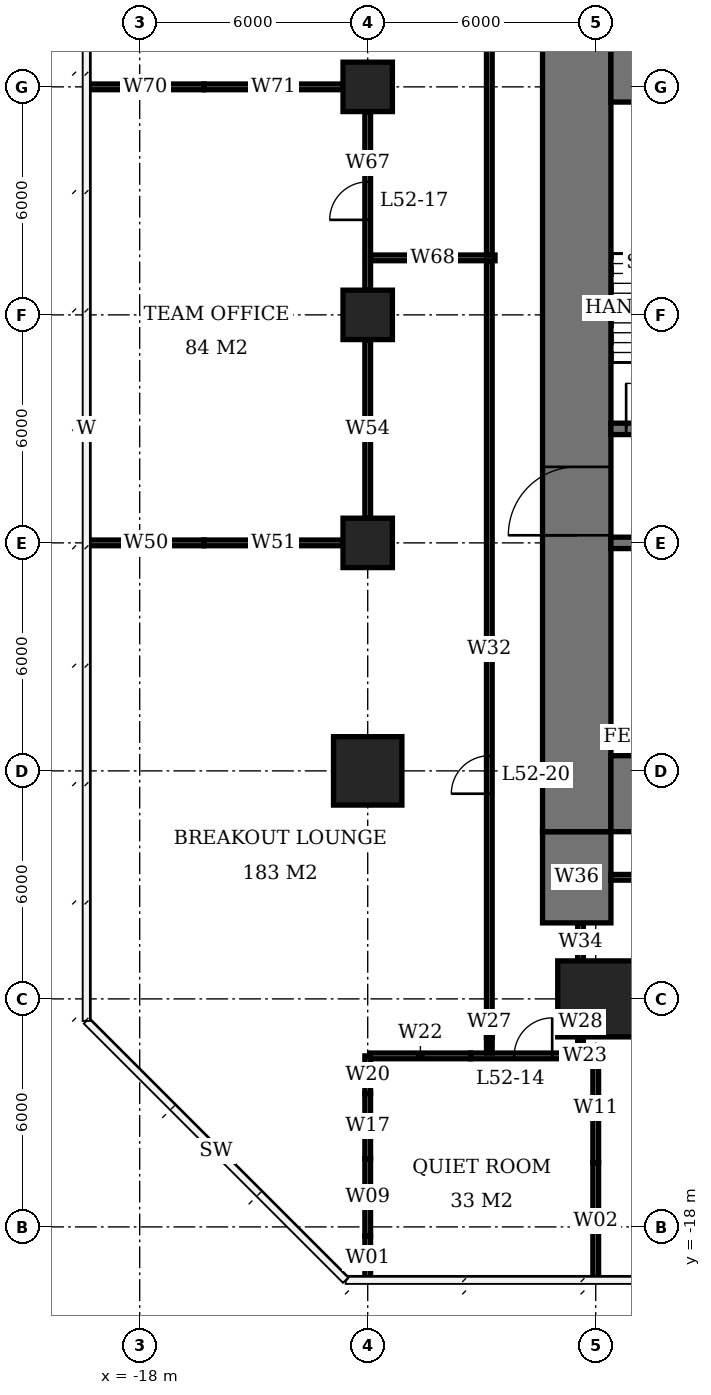
"""IFC4 building model, lengths in metres.
Left out: names, types, materials, properties, quantities, classifications, styles, units other than length and angle.
Written with IfcOpenShell. Run it as: python <this file> out.ifc"""

import sys

from ifc_helpers import new_model, si_unit, direction, frame, frame_2d, origin, origin_2d, place, context, subcontext, project, spatial, rectangle, extrude, element, fill, save


model = new_model("IFC4")
c1 = context("Model", 3, precision=1e-05, world=origin(), true_north=direction((0.0, 1.0)))
c2 = subcontext(c1, "Body", "Model", "MODEL_VIEW")
j1 = project(units=[si_unit("LENGTHUNIT", "METRE"), si_unit("PLANEANGLEUNIT", "RADIAN")], contexts=[c1])
p1 = place(None, origin())
s1 = spatial("IfcSite", under=j1, at=p1, CompositionType="ELEMENT")
p2 = place(p1, origin())
s2 = spatial("IfcBuilding", under=s1, at=p2, CompositionType="ELEMENT")
p3 = place(p2, frame((0.0, 0.0, 212.3)))
s3 = spatial("IfcBuildingStorey", under=s2, at=p3, CompositionType="ELEMENT", Elevation=212.3)
p4 = place(p3, frame((-12.0, -6.0, 0.0), z_axis=(0.0, 0.0, 1.0), x_axis=(1.0, 0.0, 0.0)))
e1 = element("IfcColumn", 1, at=p4, inside=s3, PredefinedType="COLUMN", context=c2, shape_type="SweptSolid", body=[
    extrude(rectangle(XDim=1.8, YDim=1.8, at=origin_2d()), origin(), (0.0, 0.0, 1.0), 3.9),
])
for number, where, z_axis, x_axis in (
    (2, (-12.0, 0.0, 0.0), (0.0, 0.0, 1.0), (1.0, 0.0, 0.0)),
    (3, (-12.0, 6.0, 0.0), (0.0, 0.0, 1.0), (1.0, 0.0, 0.0)),
    (4, (-12.0, 12.0, 0.0), (0.0, 0.0, 1.0), (1.0, 0.0, 0.0)),
):
    element("IfcColumn", number, at=place(p3, frame(where, z_axis=z_axis, x_axis=x_axis)), inside=s3, PredefinedType="COLUMN", context=c2, shape_type="SweptSolid", body=[
        extrude(rectangle(XDim=1.3, YDim=1.3, at=origin_2d()), origin(), (0.0, 0.0, 1.0), 3.9),
    ])
p5 = place(p3, frame((-6.0, -12.0, 0.0), z_axis=(0.0, 0.0, 1.0), x_axis=(1.0, 0.0, 0.0)))
e5 = element("IfcColumn", 5, at=p5, inside=s3, PredefinedType="COLUMN", context=c2, shape_type="SweptSolid", body=[
    extrude(rectangle(XDim=2.0, YDim=2.0, at=origin_2d()), origin(), (0.0, 0.0, 1.0), 3.9),
])
for number, where, z_axis, x_axis in (
    (6, (-5.6, -6.6, 0.0), (0.0, 0.0, 1.0), (1.0, 0.0, 0.0)),
    (7, (-5.6, 12.6, 0.0), (0.0, 0.0, 1.0), (1.0, 0.0, 0.0)),
):
    element("IfcWall", number, at=place(p3, frame(where, z_axis=z_axis, x_axis=x_axis)), inside=s3, PredefinedType="SHEAR", context=c2, shape_type="SweptSolid", body=[
        extrude(rectangle(XDim=23.2, YDim=2.0, at=frame_2d((11.6, 0.0))), origin(), (0.0, 0.0, 1.0), 3.9),
    ])
p6 = place(p3, frame((-6.5, -7.6, 0.0), z_axis=(0.0, 0.0, 1.0), x_axis=(0.0, 1.0, 0.0)))
e8 = element("IfcWall", 8, at=p6, inside=s3, PredefinedType="SHEAR", context=c2, shape_type="SweptSolid", body=[
    extrude(rectangle(XDim=21.2, YDim=1.8, at=frame_2d((10.6, 0.0))), origin(), (0.0, 0.0, 1.0), 3.9),
])
p7 = place(p6, frame((7.8, 0.0, 0.0)))
e9 = element("IfcOpeningElement", 9, at=p7, cuts=e8, PredefinedType="OPENING", context=c2, shape_type="SweptSolid", body=[
    extrude(rectangle(XDim=1.8, YDim=2.4, at=frame_2d((0.9, 1.2))), frame((0.0, 0.91, 0.0), z_axis=(0.0, -1.0, 0.0), x_axis=(1.0, 0.0, 0.0)), (0.0, 0.0, 1.0), 1.82),
])
p8 = place(p3, frame((-6.5, -10.0, 0.0), z_axis=(0.0, 0.0, 1.0), x_axis=(0.0, 1.0, 0.0)))
e10 = element("IfcWall", 10, at=p8, inside=s3, PredefinedType="SHEAR", context=c2, shape_type="SweptSolid", body=[
    extrude(rectangle(XDim=2.4, YDim=1.8, at=frame_2d((1.2, 0.0))), origin(), (0.0, 0.0, 1.0), 3.9),
])
p9 = place(p3, frame((-5.6, 0.0, 0.0), z_axis=(0.0, 0.0, 1.0), x_axis=(1.0, 0.0, 0.0)))
e11 = element("IfcWall", 11, at=p9, inside=s3, PredefinedType="SHEAR", context=c2, shape_type="SweptSolid", body=[
    extrude(rectangle(XDim=17.75, YDim=0.3, at=frame_2d((8.875, 0.0))), origin(), (0.0, 0.0, 1.0), 3.9),
])
p10 = place(p9, frame((0.6, 0.0, 0.0)))
e12 = element("IfcOpeningElement", 12, at=p10, cuts=e11, PredefinedType="OPENING", context=c2, shape_type="SweptSolid", body=[
    extrude(rectangle(XDim=0.9, YDim=2.1, at=frame_2d((0.45, 1.05))), frame((0.0, 0.16, 0.0), z_axis=(0.0, -1.0, 0.0), x_axis=(1.0, 0.0, 0.0)), (0.0, 0.0, 1.0), 0.32),
])
p11 = place(p9, frame((3.7, 0.0, 0.0)))
e13 = element("IfcOpeningElement", 13, at=p11, cuts=e11, PredefinedType="OPENING", context=c2, shape_type="SweptSolid", body=[
    extrude(rectangle(XDim=1.0, YDim=2.1, at=frame_2d((0.5, 1.05))), frame((0.0, 0.16, 0.0), z_axis=(0.0, -1.0, 0.0), x_axis=(1.0, 0.0, 0.0)), (0.0, 0.0, 1.0), 0.32),
])
p12 = place(p9, frame((9.6, 0.0, 0.0)))
e14 = element("IfcOpeningElement", 14, at=p12, cuts=e11, PredefinedType="OPENING", context=c2, shape_type="SweptSolid", body=[
    extrude(rectangle(XDim=1.0, YDim=2.1, at=frame_2d((0.5, 1.05))), frame((0.0, 0.16, 0.0), z_axis=(0.0, -1.0, 0.0), x_axis=(1.0, 0.0, 0.0)), (0.0, 0.0, 1.0), 0.32),
])
p13 = place(p9, frame((12.55, 0.0, 0.0)))
e15 = element("IfcOpeningElement", 15, at=p13, cuts=e11, PredefinedType="OPENING", context=c2, shape_type="SweptSolid", body=[
    extrude(rectangle(XDim=1.1, YDim=2.1, at=frame_2d((0.55, 1.05))), frame((0.0, 0.16, 0.0), z_axis=(0.0, -1.0, 0.0), x_axis=(1.0, 0.0, 0.0)), (0.0, 0.0, 1.0), 0.32),
])
p14 = place(p9, frame((15.55, 0.0, 0.0)))
e16 = element("IfcOpeningElement", 16, at=p14, cuts=e11, PredefinedType="OPENING", context=c2, shape_type="SweptSolid", body=[
    extrude(rectangle(XDim=1.1, YDim=2.1, at=frame_2d((0.55, 1.05))), frame((0.0, 0.16, 0.0), z_axis=(0.0, -1.0, 0.0), x_axis=(1.0, 0.0, 0.0)), (0.0, 0.0, 1.0), 0.32),
])
p15 = place(p3, frame((-5.6, 3.0, 0.0), z_axis=(0.0, 0.0, 1.0), x_axis=(1.0, 0.0, 0.0)))
e17 = element("IfcWall", 17, at=p15, inside=s3, PredefinedType="SHEAR", context=c2, shape_type="SweptSolid", body=[
    extrude(rectangle(XDim=5.45, YDim=0.3, at=frame_2d((2.725, 0.0))), origin(), (0.0, 0.0, 1.0), 3.9),
])
p16 = place(p15, frame((0.4, 0.0, 0.0)))
e18 = element("IfcOpeningElement", 18, at=p16, cuts=e17, PredefinedType="OPENING", context=c2, shape_type="SweptSolid", body=[
    extrude(rectangle(XDim=1.2, YDim=2.1, at=frame_2d((0.6, 1.05))), frame((0.0, 0.16, 0.0), z_axis=(0.0, -1.0, 0.0), x_axis=(1.0, 0.0, 0.0)), (0.0, 0.0, 1.0), 0.32),
])
p17 = place(p15, frame((3.95, 0.0, 0.0)))
e19 = element("IfcOpeningElement", 19, at=p17, cuts=e17, PredefinedType="OPENING", context=c2, shape_type="SweptSolid", body=[
    extrude(rectangle(XDim=0.9, YDim=2.1, at=frame_2d((0.45, 1.05))), frame((0.0, 0.16, 0.0), z_axis=(0.0, -1.0, 0.0), x_axis=(1.0, 0.0, 0.0)), (0.0, 0.0, 1.0), 0.32),
])
p18 = place(p3, frame((-11.935, -13.5, 0.0), z_axis=(0.0, 0.0, 1.0), x_axis=(1.0, 0.0, 0.0)))
e20 = element("IfcWall", 20, at=p18, inside=s3, PredefinedType="PARTITIONING", context=c2, shape_type="SweptSolid", body=[
    extrude(rectangle(XDim=2.643, YDim=0.15, at=frame_2d((1.322, 0.0))), origin(), (0.0, 0.0, 1.0), 3.65),
])
p19 = place(p3, frame((-9.292, -13.5, 0.0), z_axis=(0.0, 0.0, 1.0), x_axis=(1.0, 0.0, 0.0)))
e21 = element("IfcWall", 21, at=p19, inside=s3, PredefinedType="PARTITIONING", context=c2, shape_type="SweptSolid", body=[
    extrude(rectangle(XDim=3.217, YDim=0.15, at=frame_2d((1.608, 0.0))), origin(), (0.0, 0.0, 1.0), 2.65),
])
p20 = place(p19, frame((1.146, 0.0, 0.0)))
e22 = element("IfcOpeningElement", 22, at=p20, cuts=e21, PredefinedType="OPENING", context=c2, shape_type="SweptSolid", body=[
    extrude(rectangle(XDim=1.0, YDim=2.1, at=frame_2d((0.5, 1.05))), frame((0.0, 0.085, 0.0), z_axis=(0.0, -1.0, 0.0), x_axis=(1.0, 0.0, 0.0)), (0.0, 0.0, 1.0), 0.17),
])
p21 = place(p3, frame((-19.35, 0.0, 0.0), z_axis=(0.0, 0.0, 1.0), x_axis=(1.0, 0.0, 0.0)))
e23 = element("IfcWall", 23, at=p21, inside=s3, PredefinedType="PARTITIONING", context=c2, shape_type="SweptSolid", body=[
    extrude(rectangle(XDim=3.04, YDim=0.15, at=frame_2d((1.52, 0.0))), origin(), (0.0, 0.0, 1.0), 3.65),
])
p22 = place(p3, frame((-16.31, 0.0, 0.0), z_axis=(0.0, 0.0, 1.0), x_axis=(1.0, 0.0, 0.0)))
e24 = element("IfcWall", 24, at=p22, inside=s3, PredefinedType="PARTITIONING", context=c2, shape_type="SweptSolid", body=[
    extrude(rectangle(XDim=3.66, YDim=0.15, at=frame_2d((1.83, 0.0))), origin(), (0.0, 0.0, 1.0), 2.65),
])
p23 = place(p3, frame((-19.4, 12.0, 0.0), z_axis=(0.0, 0.0, 1.0), x_axis=(1.0, 0.0, 0.0)))
e25 = element("IfcWall", 25, at=p23, inside=s3, PredefinedType="PARTITIONING", context=c2, shape_type="SweptSolid", body=[
    extrude(rectangle(XDim=3.09, YDim=0.15, at=frame_2d((1.545, 0.0))), origin(), (0.0, 0.0, 1.0), 3.65),
])
p24 = place(p3, frame((-16.31, 12.0, 0.0), z_axis=(0.0, 0.0, 1.0), x_axis=(1.0, 0.0, 0.0)))
e26 = element("IfcWall", 26, at=p24, inside=s3, PredefinedType="PARTITIONING", context=c2, shape_type="SweptSolid", body=[
    extrude(rectangle(XDim=3.66, YDim=0.15, at=frame_2d((1.83, 0.0))), origin(), (0.0, 0.0, 1.0), 2.65),
])
p25 = place(p3, frame((-12.0, -19.4, 0.0), z_axis=(0.0, 0.0, 1.0), x_axis=(0.0, 1.0, 0.0)))
e27 = element("IfcWall", 27, at=p25, inside=s3, PredefinedType="PARTITIONING", context=c2, shape_type="SweptSolid", body=[
    extrude(rectangle(XDim=1.163, YDim=0.15, at=frame_2d((0.582, 0.0))), origin(), (0.0, 0.0, 1.0), 3.65),
])
p26 = place(p3, frame((-12.0, -18.237, 0.0), z_axis=(0.0, 0.0, 1.0), x_axis=(0.0, 1.0, 0.0)))
e28 = element("IfcWall", 28, at=p26, inside=s3, PredefinedType="PARTITIONING", context=c2, shape_type="SweptSolid", body=[
    extrude(rectangle(XDim=2.029, YDim=0.15, at=frame_2d((1.015, 0.0))), origin(), (0.0, 0.0, 1.0), 2.65),
])
p27 = place(p3, frame((-12.0, -16.208, 0.0), z_axis=(0.0, 0.0, 1.0), x_axis=(0.0, 1.0, 0.0)))
e29 = element("IfcWall", 29, at=p27, inside=s3, PredefinedType="PARTITIONING", context=c2, shape_type="SweptSolid", body=[
    extrude(rectangle(XDim=1.718, YDim=0.15, at=frame_2d((0.859, 0.0))), origin(), (0.0, 0.0, 1.0), 3.65),
])
p28 = place(p3, frame((-12.0, -14.49, 0.0), z_axis=(0.0, 0.0, 1.0), x_axis=(0.0, 1.0, 0.0)))
e30 = element("IfcWall", 30, at=p28, inside=s3, PredefinedType="PARTITIONING", context=c2, shape_type="SweptSolid", body=[
    extrude(rectangle(XDim=0.99, YDim=0.15, at=frame_2d((0.495, 0.0))), origin(), (0.0, 0.0, 1.0), 2.65),
])
p29 = place(p3, frame((-12.0, 0.66, 0.0), z_axis=(0.0, 0.0, 1.0), x_axis=(0.0, 1.0, 0.0)))
e31 = element("IfcWall", 31, at=p29, inside=s3, PredefinedType="PARTITIONING", context=c2, shape_type="SweptSolid", body=[
    extrude(rectangle(XDim=4.68, YDim=0.15, at=frame_2d((2.34, 0.0))), origin(), (0.0, 0.0, 1.0), 3.65),
])
p30 = place(p3, frame((-12.0, 6.66, 0.0), z_axis=(0.0, 0.0, 1.0), x_axis=(0.0, 1.0, 0.0)))
e32 = element("IfcWall", 32, at=p30, inside=s3, PredefinedType="PARTITIONING", context=c2, shape_type="SweptSolid", body=[
    extrude(rectangle(XDim=4.68, YDim=0.15, at=frame_2d((2.34, 0.0))), origin(), (0.0, 0.0, 1.0), 3.65),
])
p31 = place(p30, frame((1.84, 0.0, 0.0)))
e33 = element("IfcOpeningElement", 33, at=p31, cuts=e32, PredefinedType="OPENING", context=c2, shape_type="SweptSolid", body=[
    extrude(rectangle(XDim=1.0, YDim=2.1, at=frame_2d((0.5, 1.05))), frame((0.0, 0.085, 0.0), z_axis=(0.0, -1.0, 0.0), x_axis=(1.0, 0.0, 0.0)), (0.0, 0.0, 1.0), 0.17),
])
p32 = place(p3, frame((-6.0, -19.4, 0.0), z_axis=(0.0, 0.0, 1.0), x_axis=(0.0, 1.0, 0.0)))
e34 = element("IfcWall", 34, at=p32, inside=s3, PredefinedType="PARTITIONING", context=c2, shape_type="SweptSolid", body=[
    extrude(rectangle(XDim=3.09, YDim=0.15, at=frame_2d((1.545, 0.0))), origin(), (0.0, 0.0, 1.0), 3.65),
])
p33 = place(p3, frame((-6.0, -16.31, 0.0), z_axis=(0.0, 0.0, 1.0), x_axis=(0.0, 1.0, 0.0)))
e35 = element("IfcWall", 35, at=p33, inside=s3, PredefinedType="PARTITIONING", context=c2, shape_type="SweptSolid", body=[
    extrude(rectangle(XDim=2.885, YDim=0.15, at=frame_2d((1.442, 0.0))), origin(), (0.0, 0.0, 1.0), 2.65),
])
p34 = place(p3, frame((-11.925, 7.5, 0.0), z_axis=(0.0, 0.0, 1.0), x_axis=(1.0, 0.0, 0.0)))
e36 = element("IfcWall", 36, at=p34, inside=s3, PredefinedType="PARTITIONING", context=c2, shape_type="SweptSolid", body=[
    extrude(rectangle(XDim=3.275, YDim=0.15, at=frame_2d((1.638, 0.0))), origin(), (0.0, 0.0, 1.0), 3.65),
])
p35 = place(p3, frame((-8.8, -13.425, 0.0), z_axis=(0.0, 0.0, 1.0), x_axis=(0.0, 1.0, 0.0)))
e37 = element("IfcWall", 37, at=p35, inside=s3, PredefinedType="PARTITIONING", context=c2, shape_type="SweptSolid", body=[
    extrude(rectangle(XDim=0.417, YDim=0.15, at=frame_2d((0.208, 0.0))), origin(), (0.0, 0.0, 1.0), 2.65),
])
p36 = place(p3, frame((-8.8, -13.008, 0.0), z_axis=(0.0, 0.0, 1.0), x_axis=(0.0, 1.0, 0.0)))
e38 = element("IfcWall", 38, at=p36, inside=s3, PredefinedType="PARTITIONING", context=c2, shape_type="SweptSolid", body=[
    extrude(rectangle(XDim=20.433, YDim=0.15, at=frame_2d((10.216, 0.0))), origin(), (0.0, 0.0, 1.0), 3.65),
])
p37 = place(p36, frame((6.407, 0.0, 0.0)))
e39 = element("IfcOpeningElement", 39, at=p37, cuts=e38, PredefinedType="OPENING", context=c2, shape_type="SweptSolid", body=[
    extrude(rectangle(XDim=1.0, YDim=2.1, at=frame_2d((0.5, 1.05))), frame((0.0, 0.085, 0.0), z_axis=(0.0, -1.0, 0.0), x_axis=(1.0, 0.0, 0.0)), (0.0, 0.0, 1.0), 0.17),
])
p38 = place(p3, frame((-8.8, 7.575, 0.0), z_axis=(0.0, 0.0, 1.0), x_axis=(0.0, 1.0, 0.0)))
e40 = element("IfcWall", 40, at=p38, inside=s3, PredefinedType="PARTITIONING", context=c2, shape_type="SweptSolid", body=[
    extrude(rectangle(XDim=17.825, YDim=0.15, at=frame_2d((8.913, 0.0))), origin(), (0.0, 0.0, 1.0), 3.65),
])
p39 = place(p38, frame((5.655, 0.0, 0.0)))
e41 = element("IfcOpeningElement", 41, at=p39, cuts=e40, PredefinedType="OPENING", context=c2, shape_type="SweptSolid", body=[
    extrude(rectangle(XDim=1.0, YDim=2.1, at=frame_2d((0.5, 1.05))), frame((0.0, 0.085, 0.0), z_axis=(0.0, -1.0, 0.0), x_axis=(1.0, 0.0, 0.0)), (0.0, 0.0, 1.0), 0.17),
])
p40 = place(p3, frame((-6.4, -13.425, 0.0), z_axis=(0.0, 0.0, 1.0), x_axis=(0.0, 1.0, 0.0)))
e42 = element("IfcWall", 42, at=p40, inside=s3, PredefinedType="PARTITIONING", context=c2, shape_type="SweptSolid", body=[
    extrude(rectangle(XDim=0.425, YDim=0.15, at=frame_2d((0.212, 0.0))), origin(), (0.0, 0.0, 1.0), 2.65),
])
p41 = place(p3, frame((-6.4, -11.0, 0.0), z_axis=(0.0, 0.0, 1.0), x_axis=(0.0, 1.0, 0.0)))
e43 = element("IfcWall", 43, at=p41, inside=s3, PredefinedType="PARTITIONING", context=c2, shape_type="SweptSolid", body=[
    extrude(rectangle(XDim=1.0, YDim=0.15, at=frame_2d((0.5, 0.0))), origin(), (0.0, 0.0, 1.0), 3.65),
])
p42 = place(p3, frame((-5.6, -8.8, 0.0), z_axis=(0.0, 0.0, 1.0), x_axis=(1.0, 0.0, 0.0)))
e44 = element("IfcWall", 44, at=p42, inside=s3, PredefinedType="PARTITIONING", context=c2, shape_type="SweptSolid", body=[
    extrude(rectangle(XDim=16.025, YDim=0.15, at=frame_2d((8.013, 0.0))), origin(), (0.0, 0.0, 1.0), 3.65),
])
p43 = place(p42, frame((5.135, 0.0, 0.0)))
e45 = element("IfcOpeningElement", 45, at=p43, cuts=e44, PredefinedType="OPENING", context=c2, shape_type="SweptSolid", body=[
    extrude(rectangle(XDim=1.0, YDim=2.1, at=frame_2d((0.5, 1.05))), frame((0.0, 0.085, 0.0), z_axis=(0.0, -1.0, 0.0), x_axis=(1.0, 0.0, 0.0)), (0.0, 0.0, 1.0), 0.17),
])
p44 = place(p7, origin())
e46 = element("IfcDoor", 46, at=p44, inside=s3, OperationType="DOUBLE_DOOR_SINGLE_SWING", PredefinedType="DOOR", context=c2, shape_type="SweptSolid", body=[
    extrude(rectangle(XDim=1.8, YDim=2.4, at=frame_2d((0.9, 1.2))), frame((0.0, 0.025, 0.0), z_axis=(0.0, -1.0, 0.0), x_axis=(1.0, 0.0, 0.0)), (0.0, 0.0, 1.0), 0.05),
])
fill(e9, e46)
p45 = place(p16, origin())
e47 = element("IfcDoor", 47, at=p45, inside=s3, OperationType="SINGLE_SWING_LEFT", PredefinedType="DOOR", context=c2, shape_type="SweptSolid", body=[
    extrude(rectangle(XDim=1.2, YDim=2.1, at=frame_2d((0.6, 1.05))), frame((0.0, 0.025, 0.0), z_axis=(0.0, -1.0, 0.0), x_axis=(1.0, 0.0, 0.0)), (0.0, 0.0, 1.0), 0.05),
])
fill(e18, e47)
p46 = place(p20, origin())
e48 = element("IfcDoor", 48, at=p46, inside=s3, OperationType="SINGLE_SWING_RIGHT", PredefinedType="DOOR", context=c2, shape_type="SweptSolid", body=[
    extrude(rectangle(XDim=1.0, YDim=2.1, at=frame_2d((0.5, 1.05))), frame((0.0, 0.025, 0.0), z_axis=(0.0, -1.0, 0.0), x_axis=(1.0, 0.0, 0.0)), (0.0, 0.0, 1.0), 0.05),
])
fill(e22, e48)
p47 = place(p31, origin())
e49 = element("IfcDoor", 49, at=p47, inside=s3, OperationType="SINGLE_SWING_LEFT", PredefinedType="DOOR", context=c2, shape_type="SweptSolid", body=[
    extrude(rectangle(XDim=1.0, YDim=2.1, at=frame_2d((0.5, 1.05))), frame((0.0, 0.025, 0.0), z_axis=(0.0, -1.0, 0.0), x_axis=(1.0, 0.0, 0.0)), (0.0, 0.0, 1.0), 0.05),
])
fill(e33, e49)
p48 = place(p37, origin())
e50 = element("IfcDoor", 50, at=p48, inside=s3, OperationType="SINGLE_SWING_LEFT", PredefinedType="DOOR", context=c2, shape_type="SweptSolid", body=[
    extrude(rectangle(XDim=1.0, YDim=2.1, at=frame_2d((0.5, 1.05))), frame((0.0, 0.025, 0.0), z_axis=(0.0, -1.0, 0.0), x_axis=(1.0, 0.0, 0.0)), (0.0, 0.0, 1.0), 0.05),
])
fill(e39, e50)
save(model, sys.argv[1])
